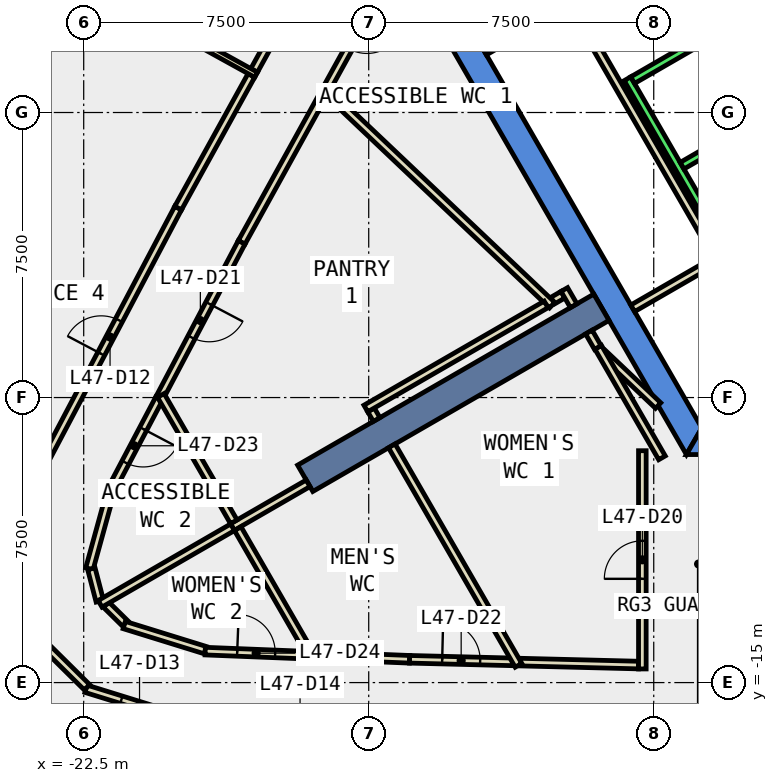
"""IFC4 building model, lengths in metres.
Left out: names, types, materials, properties, quantities, classifications, styles, units other than length and angle.
Written with IfcOpenShell. Run it as: python <this file> out.ifc"""

import sys

from ifc_helpers import new_model, si_unit, direction, frame, frame_2d, origin, place, context, subcontext, project, spatial, polyline, rectangle, outline, extrude, element, fill, save


model = new_model("IFC4")
c1 = context("Model", 3, precision=1e-05, world=origin(), true_north=direction((0.0, 1.0)))
c2 = subcontext(c1, "Body", "Model", "MODEL_VIEW")
j1 = project(units=[si_unit("LENGTHUNIT", "METRE"), si_unit("PLANEANGLEUNIT", "RADIAN")], contexts=[c1])
p1 = place(None, origin())
s1 = spatial("IfcSite", under=j1, at=p1, CompositionType="ELEMENT")
p2 = place(p1, origin())
s2 = spatial("IfcBuilding", under=s1, at=p2, CompositionType="ELEMENT")
p3 = place(p2, frame((0.0, 0.0, 210.8)))
s3 = spatial("IfcBuildingStorey", under=s2, at=p3, CompositionType="ELEMENT", Elevation=210.8)
p4 = place(p3, frame((0.0, 0.0, -0.4)))
e1 = element("IfcWall", 1, at=p4, inside=s3, PredefinedType="SHEAR", context=c2, shape_type="SweptSolid", body=[
    extrude(outline(polyline([(-13.279, 2.5), (-6.64, -9.0), (-6.235, -8.3), (-12.471, 2.5), (-13.279, 2.5)])), origin(), (0.0, 0.0, 1.0), 4.2),
])
p5 = place(p3, frame((0.0, 0.0, -0.4)))
e2 = element("IfcWall", 2, at=p5, inside=s3, PredefinedType="SHEAR", context=c2, shape_type="SweptSolid", body=[
    extrude(outline(polyline([(3.75, -9.0), (3.75, -8.3), (-6.235, -8.3), (-6.64, -9.0), (3.75, -9.0)])), origin(), (0.0, 0.0, 1.0), 4.2),
])
p6 = place(p3, frame((-8.877, -5.125, -0.4), z_axis=(0.0, 0.0, 1.0), x_axis=(-0.866017533419, -0.500013631625, 0.0)))
e3 = element("IfcWall", 3, at=p6, inside=s3, PredefinedType="SHEAR", context=c2, shape_type="SweptSolid", body=[
    extrude(rectangle(XDim=9.0, YDim=0.8, at=frame_2d((4.5, 0.0))), origin(), (0.0, 0.0, 1.0), 4.2),
])
p7 = place(p3, frame((-21.51, 7.086, 0.0), z_axis=(0.0, 0.0, 1.0), x_axis=(-0.483590905878, -0.875294142419, 0.0)))
e4 = element("IfcWall", 4, at=p7, inside=s3, PredefinedType="STANDARD", context=c2, shape_type="SweptSolid", body=[
    extrude(rectangle(XDim=7.238, YDim=0.3, at=frame_2d((3.619, 0.0))), origin(), (0.0, 0.0, 1.0), 3.8),
])
p8 = place(p7, frame((0.809, 0.0, 0.0)))
e5 = element("IfcOpeningElement", 5, at=p8, cuts=e4, PredefinedType="OPENING", context=c2, shape_type="SweptSolid", body=[
    extrude(rectangle(XDim=2.0, YDim=2.4, at=frame_2d((1.0, 1.2))), frame((0.0, 0.16, 0.0), z_axis=(0.0, -1.0, 0.0), x_axis=(1.0, 0.0, 0.0)), (0.0, 0.0, 1.0), 0.32),
])
p9 = place(p7, frame((4.228, 0.0, 0.9)))
e6 = element("IfcOpeningElement", 6, at=p9, cuts=e4, PredefinedType="OPENING", context=c2, shape_type="SweptSolid", body=[
    extrude(rectangle(XDim=2.4, YDim=2.6, at=frame_2d((1.2, 1.3))), frame((0.0, 0.16, 0.0), z_axis=(0.0, -1.0, 0.0), x_axis=(1.0, 0.0, 0.0)), (0.0, 0.0, 1.0), 0.32),
])
p10 = place(p3, frame((-22.915, 7.749, 0.0), z_axis=(0.0, 0.0, 1.0), x_axis=(-0.483435790988, -0.875379823843, 0.0)))
e7 = element("IfcWall", 7, at=p10, inside=s3, PredefinedType="STANDARD", context=c2, shape_type="SweptSolid", body=[
    extrude(rectangle(XDim=7.039, YDim=0.8, at=frame_2d((3.52, 0.0))), origin(), (0.0, 0.0, 1.0), 0.8),
])
p11 = place(p3, frame((-14.487, 3.564, 0.0), z_axis=(0.0, 0.0, 1.0), x_axis=(-0.483555199903, -0.875313868648, 0.0)))
e8 = element("IfcWall", 8, at=p11, inside=s3, PredefinedType="PARTITIONING", context=c2, shape_type="SweptSolid", body=[
    extrude(rectangle(XDim=3.309, YDim=0.2, at=frame_2d((1.654, 0.0))), origin(), (0.0, 0.0, 1.0), 3.8),
])
p12 = place(p11, frame((1.154, 0.0, 0.0)))
e9 = element("IfcOpeningElement", 9, at=p12, cuts=e8, PredefinedType="OPENING", context=c2, shape_type="SweptSolid", body=[
    extrude(rectangle(XDim=1.0, YDim=2.1, at=frame_2d((0.5, 1.05))), frame((0.0, 0.11, 0.0), z_axis=(0.0, -1.0, 0.0), x_axis=(1.0, 0.0, 0.0)), (0.0, 0.0, 1.0), 0.22),
])
p13 = place(p3, frame((-11.009, -14.461, 0.0), z_axis=(0.0, 0.0, 1.0), x_axis=(0.999684451251, -0.025119672116, 0.0)))
e10 = element("IfcWall", 10, at=p13, inside=s3, PredefinedType="PARTITIONING", context=c2, shape_type="SweptSolid", body=[
    extrude(rectangle(XDim=3.11, YDim=0.2, at=frame_2d((1.555, 0.0))), origin(), (0.0, 0.0, 1.0), 3.8),
])
p14 = place(p3, frame((-16.184, 0.493, 0.0), z_axis=(0.0, 0.0, 1.0), x_axis=(-0.48354397003, -0.875320072344, 0.0)))
e11 = element("IfcWall", 11, at=p14, inside=s3, PredefinedType="PARTITIONING", context=c2, shape_type="SweptSolid", body=[
    extrude(rectangle(XDim=4.467, YDim=0.2, at=frame_2d((2.233, 0.0))), origin(), (0.0, 0.0, 1.0), 3.8),
])
p15 = place(p3, frame((-18.344, -3.417, 0.0), z_axis=(0.0, 0.0, 1.0), x_axis=(-0.466889669343, -0.884315575267, 0.0)))
e12 = element("IfcWall", 12, at=p15, inside=s3, PredefinedType="PARTITIONING", context=c2, shape_type="SweptSolid", body=[
    extrude(rectangle(XDim=4.654, YDim=0.2, at=frame_2d((2.327, 0.0))), origin(), (0.0, 0.0, 1.0), 3.8),
])
p16 = place(p15, frame((1.827, 0.0, 0.0)))
e13 = element("IfcOpeningElement", 13, at=p16, cuts=e12, PredefinedType="OPENING", context=c2, shape_type="SweptSolid", body=[
    extrude(rectangle(XDim=1.0, YDim=2.1, at=frame_2d((0.5, 1.05))), frame((0.0, 0.11, 0.0), z_axis=(0.0, -1.0, 0.0), x_axis=(1.0, 0.0, 0.0)), (0.0, 0.0, 1.0), 0.22),
])
p17 = place(p3, frame((-16.422, -14.287, 0.0), z_axis=(0.0, 0.0, 1.0), x_axis=(0.999201426829, -0.039956333943, 0.0)))
e14 = element("IfcWall", 14, at=p17, inside=s3, PredefinedType="PARTITIONING", context=c2, shape_type="SweptSolid", body=[
    extrude(rectangle(XDim=2.499, YDim=0.2, at=frame_2d((1.25, 0.0))), origin(), (0.0, 0.0, 1.0), 3.8),
])
p18 = place(p3, frame((-13.925, -14.387, 0.0), z_axis=(0.0, 0.0, 1.0), x_axis=(0.999685678874, -0.025070768935, 0.0)))
e15 = element("IfcWall", 15, at=p18, inside=s3, PredefinedType="PARTITIONING", context=c2, shape_type="SweptSolid", body=[
    extrude(rectangle(XDim=2.717, YDim=0.2, at=frame_2d((1.358, 0.0))), origin(), (0.0, 0.0, 1.0), 3.8),
])
p19 = place(p18, frame((0.858, 0.0, 0.0)))
e16 = element("IfcOpeningElement", 16, at=p19, cuts=e15, PredefinedType="OPENING", context=c2, shape_type="SweptSolid", body=[
    extrude(rectangle(XDim=1.0, YDim=2.1, at=frame_2d((0.5, 1.05))), frame((0.0, 0.11, 0.0), z_axis=(0.0, -1.0, 0.0), x_axis=(1.0, 0.0, 0.0)), (0.0, 0.0, 1.0), 0.22),
])
p20 = place(p3, frame((-20.517, -7.533, 0.0), z_axis=(0.0, 0.0, 1.0), x_axis=(-0.466570716246, -0.88448389852, 0.0)))
e17 = element("IfcWall", 17, at=p20, inside=s3, PredefinedType="PARTITIONING", context=c2, shape_type="SweptSolid", body=[
    extrude(rectangle(XDim=2.795, YDim=0.2, at=frame_2d((1.397, 0.0))), origin(), (0.0, 0.0, 1.0), 3.8),
])
p21 = place(p20, frame((0.897, 0.0, 0.0)))
e18 = element("IfcOpeningElement", 18, at=p21, cuts=e17, PredefinedType="OPENING", context=c2, shape_type="SweptSolid", body=[
    extrude(rectangle(XDim=1.0, YDim=2.1, at=frame_2d((0.5, 1.05))), frame((0.0, 0.11, 0.0), z_axis=(0.0, -1.0, 0.0), x_axis=(1.0, 0.0, 0.0)), (0.0, 0.0, 1.0), 0.22),
])
p22 = place(p3, frame((-21.801, -10.013, 0.0), z_axis=(0.0, 0.0, 1.0), x_axis=(-0.265584627827, -0.964087550725, 0.0)))
e19 = element("IfcWall", 19, at=p22, inside=s3, PredefinedType="PARTITIONING", context=c2, shape_type="SweptSolid", body=[
    extrude(rectangle(XDim=2.067, YDim=0.2, at=frame_2d((1.034, 0.0))), origin(), (0.0, 0.0, 1.0), 3.8),
])
p23 = place(p3, frame((-22.298, -12.006, 0.0), z_axis=(0.0, 0.0, 1.0), x_axis=(0.252647929446, -0.967558279251, 0.0)))
e20 = element("IfcWall", 20, at=p23, inside=s3, PredefinedType="PARTITIONING", context=c2, shape_type="SweptSolid", body=[
    extrude(rectangle(XDim=0.879, YDim=0.2, at=frame_2d((0.44, 0.0))), origin(), (0.0, 0.0, 1.0), 3.8),
])
p24 = place(p3, frame((-21.912, -12.948, 0.0), z_axis=(0.0, 0.0, 1.0), x_axis=(0.712089244685, -0.702088959893, 0.0)))
e21 = element("IfcWall", 21, at=p24, inside=s3, PredefinedType="PARTITIONING", context=c2, shape_type="SweptSolid", body=[
    extrude(rectangle(XDim=0.708, YDim=0.2, at=frame_2d((0.354, 0.0))), origin(), (0.0, 0.0, 1.0), 3.8),
])
p25 = place(p3, frame((-21.433, -13.486, 0.0), z_axis=(0.0, 0.0, 1.0), x_axis=(0.955241047187, -0.295828568211, 0.0)))
e22 = element("IfcWall", 22, at=p25, inside=s3, PredefinedType="PARTITIONING", context=c2, shape_type="SweptSolid", body=[
    extrude(rectangle(XDim=2.234, YDim=0.2, at=frame_2d((1.117, 0.0))), origin(), (0.0, 0.0, 1.0), 3.8),
])
p26 = place(p3, frame((-19.303, -14.172, 0.0), z_axis=(0.0, 0.0, 1.0), x_axis=(0.999205458466, -0.03985538574, 0.0)))
e23 = element("IfcWall", 23, at=p26, inside=s3, PredefinedType="PARTITIONING", context=c2, shape_type="SweptSolid", body=[
    extrude(rectangle(XDim=2.683, YDim=0.2, at=frame_2d((1.342, 0.0))), origin(), (0.0, 0.0, 1.0), 3.8),
])
p27 = place(p26, frame((0.842, 0.0, 0.0)))
e24 = element("IfcOpeningElement", 24, at=p27, cuts=e23, PredefinedType="OPENING", context=c2, shape_type="SweptSolid", body=[
    extrude(rectangle(XDim=1.0, YDim=2.1, at=frame_2d((0.5, 1.05))), frame((0.0, 0.11, 0.0), z_axis=(0.0, -1.0, 0.0), x_axis=(1.0, 0.0, 0.0)), (0.0, 0.0, 1.0), 0.22),
])
p28 = place(p3, frame((-18.015, 1.107, 0.0), z_axis=(0.0, 0.0, 1.0), x_axis=(0.483551557311, 0.875315880938, 0.0)))
e25 = element("IfcWall", 25, at=p28, inside=s3, PredefinedType="PARTITIONING", context=c2, shape_type="SweptSolid", body=[
    extrude(rectangle(XDim=3.987, YDim=0.2, at=frame_2d((1.994, 0.0))), origin(), (0.0, 0.0, 1.0), 3.8),
])
p29 = place(p3, frame((-23.598, -9.301, 0.0), z_axis=(0.0, 0.0, 1.0), x_axis=(0.466852608943, 0.884335140952, 0.0)))
e26 = element("IfcWall", 26, at=p29, inside=s3, PredefinedType="PARTITIONING", context=c2, shape_type="SweptSolid", body=[
    extrude(rectangle(XDim=7.675, YDim=0.2, at=frame_2d((3.837, 0.0))), origin(), (0.0, 0.0, 1.0), 3.8),
])
p30 = place(p29, frame((3.337, 0.0, 0.0)))
e27 = element("IfcOpeningElement", 27, at=p30, cuts=e26, PredefinedType="OPENING", context=c2, shape_type="SweptSolid", body=[
    extrude(rectangle(XDim=1.0, YDim=2.1, at=frame_2d((0.5, 1.05))), frame((0.0, 0.11, 0.0), z_axis=(0.0, -1.0, 0.0), x_axis=(1.0, 0.0, 0.0)), (0.0, 0.0, 1.0), 0.22),
])
p31 = place(p3, frame((-20.015, -2.514, 0.0), z_axis=(0.0, 0.0, 1.0), x_axis=(0.483363864601, 0.875419541933, 0.0)))
e28 = element("IfcWall", 28, at=p31, inside=s3, PredefinedType="PARTITIONING", context=c2, shape_type="SweptSolid", body=[
    extrude(rectangle(XDim=3.987, YDim=0.2, at=frame_2d((1.993, 0.0))), origin(), (0.0, 0.0, 1.0), 3.8),
])
p32 = place(p3, frame((-19.623, -16.035, 0.0), z_axis=(0.0, 0.0, 1.0), x_axis=(-0.955234616163, 0.295849333419, 0.0)))
e29 = element("IfcWall", 29, at=p32, inside=s3, PredefinedType="PARTITIONING", context=c2, shape_type="SweptSolid", body=[
    extrude(rectangle(XDim=2.947, YDim=0.2, at=frame_2d((1.473, 0.0))), origin(), (0.0, 0.0, 1.0), 3.8),
])
p33 = place(p32, frame((0.974, 0.0, 0.0)))
e30 = element("IfcOpeningElement", 30, at=p33, cuts=e29, PredefinedType="OPENING", context=c2, shape_type="SweptSolid", body=[
    extrude(rectangle(XDim=1.0, YDim=2.1, at=frame_2d((0.5, 1.05))), frame((0.0, 0.11, 0.0), z_axis=(0.0, -1.0, 0.0), x_axis=(1.0, 0.0, 0.0)), (0.0, 0.0, 1.0), 0.22),
])
p34 = place(p3, frame((-22.414, -15.123, 0.0), z_axis=(0.0, 0.0, 1.0), x_axis=(-0.710949827962, 0.703242733429, 0.0)))
e31 = element("IfcWall", 31, at=p34, inside=s3, PredefinedType="PARTITIONING", context=c2, shape_type="SweptSolid", body=[
    extrude(rectangle(XDim=2.059, YDim=0.2, at=frame_2d((1.03, 0.0))), origin(), (0.0, 0.0, 1.0), 3.8),
])
p35 = place(p3, frame((-5.888, -3.902, 0.0), z_axis=(0.0, 0.0, 1.0), x_axis=(-0.866022959057, -0.500004234368, 0.0)))
e32 = element("IfcWall", 32, at=p35, inside=s3, PredefinedType="PARTITIONING", context=c2, shape_type="SweptSolid", body=[
    extrude(rectangle(XDim=2.5, YDim=0.2, at=frame_2d((1.25, 0.0))), origin(), (0.0, 0.0, 1.0), 3.8),
])
p36 = place(p3, frame((-11.953, 1.603, 0.0), z_axis=(0.0, 0.0, 1.0), x_axis=(0.865998541277, 0.500046524342, 0.0)))
e33 = element("IfcWall", 33, at=p36, inside=s3, PredefinedType="PARTITIONING", context=c2, shape_type="SweptSolid", body=[
    extrude(rectangle(XDim=2.5, YDim=0.2, at=frame_2d((1.25, 0.0))), origin(), (0.0, 0.0, 1.0), 3.8),
])
p37 = place(p36, frame((1.5, 0.0, 0.0)))
e34 = element("IfcOpeningElement", 34, at=p37, cuts=e33, PredefinedType="OPENING", context=c2, shape_type="SweptSolid", body=[
    extrude(rectangle(XDim=0.9, YDim=2.1, at=frame_2d((0.45, 1.05))), frame((0.0, 0.11, 0.0), z_axis=(0.0, -1.0, 0.0), x_axis=(1.0, 0.0, 0.0)), (0.0, 0.0, 1.0), 0.22),
])
p38 = place(p3, frame((-9.751, 2.99, 0.0), z_axis=(0.0, 0.0, 1.0), x_axis=(0.500012163284, -0.866018381195, 0.0)))
e35 = element("IfcWall", 35, at=p38, inside=s3, PredefinedType="PARTITIONING", context=c2, shape_type="SweptSolid", body=[
    extrude(rectangle(XDim=8.0, YDim=0.2, at=frame_2d((4.0, 0.0))), origin(), (0.0, 0.0, 1.0), 3.8),
])
p39 = place(p3, frame((-8.84, -6.332, 0.0), z_axis=(0.0, 0.0, 1.0), x_axis=(0.726080635734, -0.687609562479, 0.0)))
e36 = element("IfcWall", 36, at=p39, inside=s3, PredefinedType="PARTITIONING", context=c2, shape_type="SweptSolid", body=[
    extrude(rectangle(XDim=2.005, YDim=0.2, at=frame_2d((1.003, 0.0))), origin(), (0.0, 0.0, 1.0), 3.8),
])
p40 = place(p3, frame((-7.8, -14.641, 0.0), z_axis=(0.0, 0.0, 1.0), x_axis=(0.0, 1.0, 0.0)))
e37 = element("IfcWall", 37, at=p40, inside=s3, PredefinedType="PARTITIONING", context=c2, shape_type="SweptSolid", body=[
    extrude(rectangle(XDim=5.742, YDim=0.2, at=frame_2d((2.871, 0.0))), origin(), (0.0, 0.0, 1.0), 3.8),
])
p41 = place(p40, frame((2.371, 0.0, 0.0)))
e38 = element("IfcOpeningElement", 38, at=p41, cuts=e37, PredefinedType="OPENING", context=c2, shape_type="SweptSolid", body=[
    extrude(rectangle(XDim=1.0, YDim=2.1, at=frame_2d((0.5, 1.05))), frame((0.0, 0.11, 0.0), z_axis=(0.0, -1.0, 0.0), x_axis=(1.0, 0.0, 0.0)), (0.0, 0.0, 1.0), 0.22),
])
p42 = place(p3, frame((-7.283, -9.086, 0.0), z_axis=(0.0, 0.0, 1.0), x_axis=(-0.499883958536, 0.86609238999, 0.0)))
e39 = element("IfcWall", 39, at=p42, inside=s3, PredefinedType="PARTITIONING", context=c2, shape_type="SweptSolid", body=[
    extrude(rectangle(XDim=3.359, YDim=0.2, at=frame_2d((1.679, 0.0))), origin(), (0.0, 0.0, 1.0), 3.8),
])
p43 = place(p3, frame((-8.973, -6.183, 0.0), z_axis=(0.0, 0.0, 1.0), x_axis=(-0.499557093027, 0.86628096528, 0.0)))
e40 = element("IfcWall", 40, at=p43, inside=s3, PredefinedType="PARTITIONING", context=c2, shape_type="SweptSolid", body=[
    extrude(rectangle(XDim=0.469, YDim=0.2, at=frame_2d((0.234, 0.0))), origin(), (0.0, 0.0, 1.0), 3.8),
])
p44 = place(p3, frame((-9.89, -4.795, 0.0), z_axis=(0.0, 0.0, 1.0), x_axis=(-0.866447259568, -0.499268611457, 0.0)))
e41 = element("IfcWall", 41, at=p44, inside=s3, PredefinedType="PARTITIONING", context=c2, shape_type="SweptSolid", body=[
    extrude(rectangle(XDim=0.311, YDim=0.2, at=frame_2d((0.155, 0.0))), origin(), (0.0, 0.0, 1.0), 3.8),
])
p45 = place(p3, frame((-10.173, -5.069, 0.0), z_axis=(0.0, 0.0, 1.0), x_axis=(-0.725908697087, 0.687791075468, 0.0)))
e42 = element("IfcWall", 42, at=p45, inside=s3, PredefinedType="PARTITIONING", context=c2, shape_type="SweptSolid", body=[
    extrude(rectangle(XDim=8.313, YDim=0.2, at=frame_2d((4.157, 0.0))), origin(), (0.0, 0.0, 1.0), 3.8),
])
p46 = place(p3, frame((-14.792, -8.078, 0.0), z_axis=(0.0, 0.0, 1.0), x_axis=(-0.50241736454, 0.864625231999, 0.0)))
e43 = element("IfcWall", 43, at=p46, inside=s3, PredefinedType="PARTITIONING", context=c2, shape_type="SweptSolid", body=[
    extrude(rectangle(XDim=0.292, YDim=0.2, at=frame_2d((0.146, 0.0))), origin(), (0.0, 0.0, 1.0), 3.8),
])
p47 = place(p3, frame((-15.076, -7.788, 0.0), z_axis=(0.0, 0.0, 1.0), x_axis=(0.866092814325, 0.499883223337, 0.0)))
e44 = element("IfcWall", 44, at=p47, inside=s3, PredefinedType="PARTITIONING", context=c2, shape_type="SweptSolid", body=[
    extrude(rectangle(XDim=5.477, YDim=0.2, at=frame_2d((2.739, 0.0))), origin(), (0.0, 0.0, 1.0), 3.8),
])
p48 = place(p3, frame((-11.059, -14.545, 0.0), z_axis=(0.0, 0.0, 1.0), x_axis=(-0.499935899035, 0.866062409331, 0.0)))
e45 = element("IfcWall", 45, at=p48, inside=s3, PredefinedType="PARTITIONING", context=c2, shape_type="SweptSolid", body=[
    extrude(rectangle(XDim=6.667, YDim=0.2, at=frame_2d((3.333, 0.0))), origin(), (0.0, 0.0, 1.0), 3.8),
])
p49 = place(p3, frame((-16.595, -9.757, 0.0), z_axis=(0.0, 0.0, 1.0), x_axis=(-0.866053019151, -0.499952165731, 0.0)))
e46 = element("IfcWall", 46, at=p49, inside=s3, PredefinedType="PARTITIONING", context=c2, shape_type="SweptSolid", body=[
    extrude(rectangle(XDim=2.3, YDim=0.2, at=frame_2d((1.15, 0.0))), origin(), (0.0, 0.0, 1.0), 3.8),
])
p50 = place(p3, frame((-18.55, -10.77, 0.0), z_axis=(0.0, 0.0, 1.0), x_axis=(-0.500050869834, 0.86599603208, 0.0)))
e47 = element("IfcWall", 47, at=p50, inside=s3, PredefinedType="PARTITIONING", context=c2, shape_type="SweptSolid", body=[
    extrude(rectangle(XDim=3.839, YDim=0.2, at=frame_2d((1.92, 0.0))), origin(), (0.0, 0.0, 1.0), 3.8),
])
p51 = place(p3, frame((-16.472, -14.37, 0.0), z_axis=(0.0, 0.0, 1.0), x_axis=(-0.500009715097, 0.866019794698, 0.0)))
e48 = element("IfcWall", 48, at=p51, inside=s3, PredefinedType="PARTITIONING", context=c2, shape_type="SweptSolid", body=[
    extrude(rectangle(XDim=3.948, YDim=0.2, at=frame_2d((1.974, 0.0))), origin(), (0.0, 0.0, 1.0), 3.8),
])
p52 = place(p3, frame((-18.583, -10.914, 0.0), z_axis=(0.0, 0.0, 1.0), x_axis=(-0.8659987338, -0.500046190923, 0.0)))
e49 = element("IfcWall", 49, at=p52, inside=s3, PredefinedType="PARTITIONING", context=c2, shape_type="SweptSolid", body=[
    extrude(rectangle(XDim=4.025, YDim=0.2, at=frame_2d((2.013, 0.0))), origin(), (0.0, 0.0, 1.0), 3.8),
])
p53 = place(p3, frame((-17.964, 0.993, 0.0), z_axis=(0.0, 0.0, 1.0), x_axis=(-0.875289017238, 0.483600182282, 0.0)))
e50 = element("IfcWall", 50, at=p53, inside=s3, PredefinedType="PARTITIONING", context=c2, shape_type="SweptSolid", body=[
    extrude(rectangle(XDim=5.9, YDim=0.15, at=frame_2d((2.95, 0.0))), origin(), (0.0, 0.0, 1.0), 3.8),
])
p54 = place(p3, frame((-9.607, -5.084, 0.0), z_axis=(0.0, 0.0, 1.0), x_axis=(-0.500194922027, 0.865912836248, 0.0)))
e51 = element("IfcWall", 51, at=p54, inside=s3, PredefinedType="PARTITIONING", context=c2, shape_type="SweptSolid", body=[
    extrude(rectangle(XDim=0.492, YDim=0.2, at=frame_2d((0.246, 0.0))), origin(), (0.0, 0.0, 1.0), 3.8),
])
p55 = place(p3, frame((-8.192, 0.888, 0.0), z_axis=(0.0, 0.0, 1.0), x_axis=(0.500034260056, -0.866005622828, 0.0)))
e52 = element("IfcWall", 52, at=p55, inside=s3, PredefinedType="STANDARD", context=c2, shape_type="SweptSolid", body=[
    extrude(rectangle(XDim=5.399, YDim=0.2, at=frame_2d((2.7, 0.0))), origin(), (0.0, 0.0, 1.0), 3.8),
])
for number, where, z_axis, x_axis in (
    (53, (-5.977, 2.052, 0.0), (0.0, 0.0, 1.0), (-0.866, -0.5, 0.0)),
    (54, (-4.677, -0.2, 0.0), (0.0, 0.0, 1.0), (-0.866, -0.5, 0.0)),
):
    element("IfcWall", number, at=place(p3, frame(where, z_axis=z_axis, x_axis=x_axis)), inside=s3, PredefinedType="STANDARD", context=c2, shape_type="SweptSolid", body=[
        extrude(rectangle(XDim=2.399, YDim=0.2, at=frame_2d((1.2, 0.0))), origin(), (0.0, 0.0, 1.0), 3.8),
    ])
p56 = place(p30, origin())
e55 = element("IfcDoor", 55, at=p56, inside=s3, OperationType="SINGLE_SWING_LEFT", PredefinedType="DOOR", context=c2, shape_type="SweptSolid", body=[
    extrude(rectangle(XDim=1.0, YDim=2.1, at=frame_2d((0.5, 1.05))), frame((0.0, 0.025, 0.0), z_axis=(0.0, -1.0, 0.0), x_axis=(1.0, 0.0, 0.0)), (0.0, 0.0, 1.0), 0.05),
])
fill(e27, e55)
p57 = place(p33, origin())
e56 = element("IfcDoor", 56, at=p57, inside=s3, OperationType="SINGLE_SWING_LEFT", PredefinedType="DOOR", context=c2, shape_type="SweptSolid", body=[
    extrude(rectangle(XDim=1.0, YDim=2.1, at=frame_2d((0.5, 1.05))), frame((0.0, 0.025, 0.0), z_axis=(0.0, -1.0, 0.0), x_axis=(1.0, 0.0, 0.0)), (0.0, 0.0, 1.0), 0.05),
])
fill(e30, e56)
p58 = place(p41, origin())
e57 = element("IfcDoor", 57, at=p58, inside=s3, OperationType="SINGLE_SWING_LEFT", PredefinedType="DOOR", context=c2, shape_type="SweptSolid", body=[
    extrude(rectangle(XDim=1.0, YDim=2.1, at=frame_2d((0.5, 1.05))), frame((0.0, 0.025, 0.0), z_axis=(0.0, -1.0, 0.0), x_axis=(1.0, 0.0, 0.0)), (0.0, 0.0, 1.0), 0.05),
])
fill(e38, e57)
p59 = place(p16, origin())
e58 = element("IfcDoor", 58, at=p59, inside=s3, OperationType="SINGLE_SWING_LEFT", PredefinedType="DOOR", context=c2, shape_type="SweptSolid", body=[
    extrude(rectangle(XDim=1.0, YDim=2.1, at=frame_2d((0.5, 1.05))), frame((0.0, 0.025, 0.0), z_axis=(0.0, -1.0, 0.0), x_axis=(1.0, 0.0, 0.0)), (0.0, 0.0, 1.0), 0.05),
])
fill(e13, e58)
p60 = place(p19, origin())
e59 = element("IfcDoor", 59, at=p60, inside=s3, OperationType="SINGLE_SWING_LEFT", PredefinedType="DOOR", context=c2, shape_type="SweptSolid", body=[
    extrude(rectangle(XDim=1.0, YDim=2.1, at=frame_2d((0.5, 1.05))), frame((0.0, 0.025, 0.0), z_axis=(0.0, -1.0, 0.0), x_axis=(1.0, 0.0, 0.0)), (0.0, 0.0, 1.0), 0.05),
])
fill(e16, e59)
p61 = place(p21, origin())
e60 = element("IfcDoor", 60, at=p61, inside=s3, OperationType="SINGLE_SWING_LEFT", PredefinedType="DOOR", context=c2, shape_type="SweptSolid", body=[
    extrude(rectangle(XDim=1.0, YDim=2.1, at=frame_2d((0.5, 1.05))), frame((0.0, 0.025, 0.0), z_axis=(0.0, -1.0, 0.0), x_axis=(1.0, 0.0, 0.0)), (0.0, 0.0, 1.0), 0.05),
])
fill(e18, e60)
p62 = place(p27, origin())
e61 = element("IfcDoor", 61, at=p62, inside=s3, OperationType="SINGLE_SWING_LEFT", PredefinedType="DOOR", context=c2, shape_type="SweptSolid", body=[
    extrude(rectangle(XDim=1.0, YDim=2.1, at=frame_2d((0.5, 1.05))), frame((0.0, 0.025, 0.0), z_axis=(0.0, -1.0, 0.0), x_axis=(1.0, 0.0, 0.0)), (0.0, 0.0, 1.0), 0.05),
])
fill(e24, e61)
save(model, sys.argv[1])
